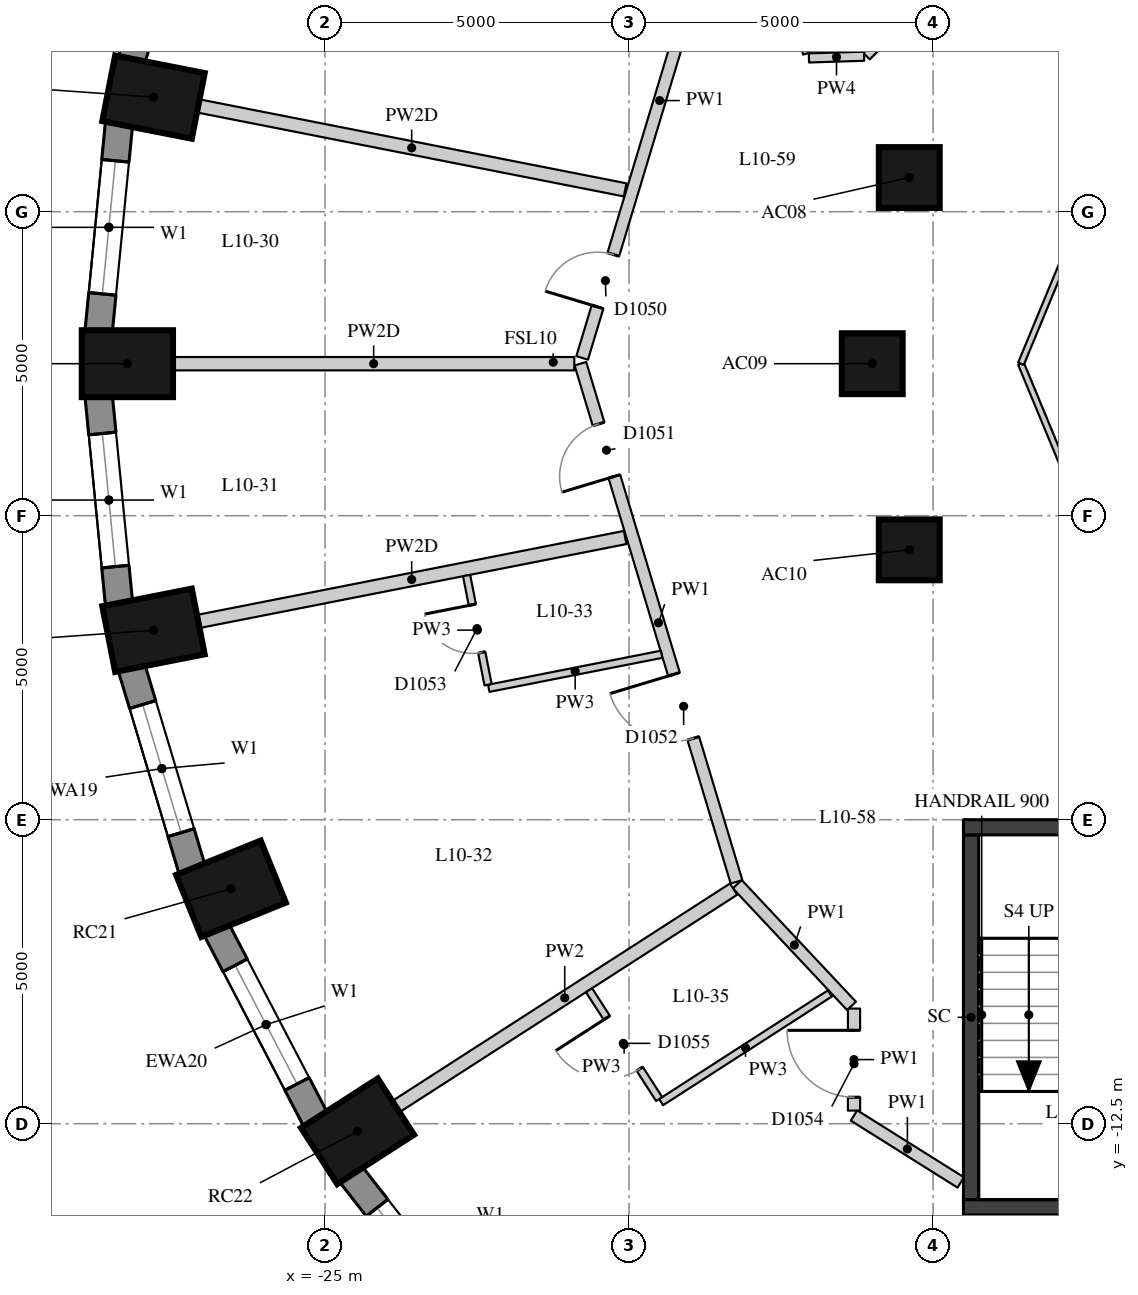
"""IFC4 building model, lengths in metres.
Left out: names, types, materials, properties, quantities, classifications, styles, units other than length and angle.
Written with IfcOpenShell. Run it as: python <this file> out.ifc"""

import sys

from ifc_helpers import new_model, si_unit, direction, frame, frame_2d, origin, origin_2d, place, context, subcontext, project, spatial, rectangle, extrude, element, fill, save


model = new_model("IFC4")
c1 = context("Model", 3, precision=1e-05, world=origin(), true_north=direction((0.0, 1.0)))
c2 = subcontext(c1, "Body", "Model", "MODEL_VIEW")
j1 = project(units=[si_unit("LENGTHUNIT", "METRE"), si_unit("PLANEANGLEUNIT", "RADIAN")], contexts=[c1])
p1 = place(None, origin())
s1 = spatial("IfcSite", under=j1, at=p1, CompositionType="ELEMENT")
p2 = place(p1, origin())
s2 = spatial("IfcBuilding", under=s1, at=p2, CompositionType="ELEMENT")
p3 = place(p2, frame((0.0, 0.0, 41.5)))
s3 = spatial("IfcBuildingStorey", under=s2, at=p3, CompositionType="ELEMENT", Elevation=41.5)
for number, where, z_axis, x_axis in (
    (1, (-27.821, 4.385, 0.0), (0.0, 0.0, 1.0), (-0.981, 0.193, 0.0)),
    (2, (-28.25, 0.0, 0.0), (0.0, 0.0, 1.0), (-1.0, 0.0, 0.0)),
    (3, (-27.821, -4.385, 0.0), (0.0, 0.0, 1.0), (-0.981, -0.193, 0.0)),
    (4, (-26.546, -8.636, 0.0), (0.0, 0.0, 1.0), (-0.927, -0.376, 0.0)),
    (5, (-24.465, -12.625, 0.0), (0.0, 0.0, 1.0), (-0.841, -0.541, 0.0)),
):
    element("IfcColumn", number, at=place(p3, frame(where, z_axis=z_axis, x_axis=x_axis)), inside=s3, PredefinedType="COLUMN", context=c2, shape_type="SweptSolid", body=[
        extrude(rectangle(XDim=1.5, YDim=1.1, at=origin_2d()), origin(), (0.0, 0.0, 1.0), 3.3),
    ])
for number, where, z_axis, x_axis in (
    (6, (-15.391, 3.062, 0.0), (0.0, 0.0, 1.0), (1.0, 0.0, 0.0)),
    (7, (-16.0, 0.0, 0.0), (0.0, 0.0, 1.0), (1.0, 0.0, 0.0)),
    (8, (-15.391, -3.062, 0.0), (0.0, 0.0, 1.0), (1.0, 0.0, 0.0)),
):
    element("IfcColumn", number, at=place(p3, frame(where, z_axis=z_axis, x_axis=x_axis)), inside=s3, PredefinedType="COLUMN", context=c2, shape_type="SweptSolid", body=[
        extrude(rectangle(XDim=1.0, YDim=1.0, at=origin_2d()), origin(), (0.0, 0.0, 1.0), 3.3),
    ])
p4 = place(p3, frame((-27.185, 8.323, 0.0), z_axis=(0.0, 0.0, 1.0), x_axis=(-0.287064133733, -0.957911364963, 0.0)))
e9 = element("IfcWall", 9, at=p4, inside=s3, PredefinedType="SOLIDWALL", context=c2, shape_type="SweptSolid", body=[
    extrude(rectangle(XDim=3.473, YDim=0.45, at=frame_2d((1.737, 0.0))), origin(), (0.0, 0.0, 1.0), 3.02),
])
p5 = place(p4, frame((0.637, 0.0, 0.4)))
e10 = element("IfcOpeningElement", 10, at=p5, cuts=e9, PredefinedType="OPENING", context=c2, shape_type="SweptSolid", body=[
    extrude(rectangle(XDim=2.2, YDim=1.75, at=frame_2d((1.1, 0.875))), frame((0.0, 0.235, 0.0), z_axis=(0.0, -1.0, 0.0), x_axis=(1.0, 0.0, 0.0)), (0.0, 0.0, 1.0), 0.47),
])
p6 = place(p3, frame((-28.387, 3.956, 0.0), z_axis=(0.0, 0.0, 1.0), x_axis=(-0.097389581596, -0.995246336038, 0.0)))
e11 = element("IfcWall", 11, at=p6, inside=s3, PredefinedType="SOLIDWALL", context=c2, shape_type="SweptSolid", body=[
    extrude(rectangle(XDim=3.442, YDim=0.45, at=frame_2d((1.721, 0.0))), origin(), (0.0, 0.0, 1.0), 3.02),
])
p7 = place(p6, frame((0.621, 0.0, 0.4)))
e12 = element("IfcOpeningElement", 12, at=p7, cuts=e11, PredefinedType="OPENING", context=c2, shape_type="SweptSolid", body=[
    extrude(rectangle(XDim=2.2, YDim=1.75, at=frame_2d((1.1, 0.875))), frame((0.0, 0.235, 0.0), z_axis=(0.0, -1.0, 0.0), x_axis=(1.0, 0.0, 0.0)), (0.0, 0.0, 1.0), 0.47),
])
p8 = place(p3, frame((-28.722, -0.53, 0.0), z_axis=(0.0, 0.0, 1.0), x_axis=(0.097389581596, -0.995246336038, 0.0)))
e13 = element("IfcWall", 13, at=p8, inside=s3, PredefinedType="SOLIDWALL", context=c2, shape_type="SweptSolid", body=[
    extrude(rectangle(XDim=3.442, YDim=0.45, at=frame_2d((1.721, 0.0))), origin(), (0.0, 0.0, 1.0), 3.02),
])
p9 = place(p8, frame((0.621, 0.0, 0.4)))
e14 = element("IfcOpeningElement", 14, at=p9, cuts=e13, PredefinedType="OPENING", context=c2, shape_type="SweptSolid", body=[
    extrude(rectangle(XDim=2.2, YDim=1.75, at=frame_2d((1.1, 0.875))), frame((0.0, 0.235, 0.0), z_axis=(0.0, -1.0, 0.0), x_axis=(1.0, 0.0, 0.0)), (0.0, 0.0, 1.0), 0.47),
])
p10 = place(p3, frame((-28.182, -4.996, 0.0), z_axis=(0.0, 0.0, 1.0), x_axis=(0.287064133733, -0.957911364963, 0.0)))
e15 = element("IfcWall", 15, at=p10, inside=s3, PredefinedType="SOLIDWALL", context=c2, shape_type="SweptSolid", body=[
    extrude(rectangle(XDim=3.473, YDim=0.45, at=frame_2d((1.737, 0.0))), origin(), (0.0, 0.0, 1.0), 3.02),
])
p11 = place(p10, frame((0.637, 0.0, 0.4)))
e16 = element("IfcOpeningElement", 16, at=p11, cuts=e15, PredefinedType="OPENING", context=c2, shape_type="SweptSolid", body=[
    extrude(rectangle(XDim=2.2, YDim=1.75, at=frame_2d((1.1, 0.875))), frame((0.0, 0.235, 0.0), z_axis=(0.0, -1.0, 0.0), x_axis=(1.0, 0.0, 0.0)), (0.0, 0.0, 1.0), 0.47),
])
p12 = place(p3, frame((-26.786, -9.305, 0.0), z_axis=(0.0, 0.0, 1.0), x_axis=(0.462492775226, -0.886623050041, 0.0)))
e17 = element("IfcWall", 17, at=p12, inside=s3, PredefinedType="SOLIDWALL", context=c2, shape_type="SweptSolid", body=[
    extrude(rectangle(XDim=3.532, YDim=0.45, at=frame_2d((1.766, 0.0))), origin(), (0.0, 0.0, 1.0), 3.02),
])
p13 = place(p12, frame((0.666, 0.0, 0.4)))
e18 = element("IfcOpeningElement", 18, at=p13, cuts=e17, PredefinedType="OPENING", context=c2, shape_type="SweptSolid", body=[
    extrude(rectangle(XDim=2.2, YDim=1.75, at=frame_2d((1.1, 0.875))), frame((0.0, 0.235, 0.0), z_axis=(0.0, -1.0, 0.0), x_axis=(1.0, 0.0, 0.0)), (0.0, 0.0, 1.0), 0.47),
])
p14 = place(p3, frame((-24.578, -13.328, 0.0), z_axis=(0.0, 0.0, 1.0), x_axis=(0.616661975264, -0.787228053529, 0.0)))
e19 = element("IfcWall", 19, at=p14, inside=s3, PredefinedType="SOLIDWALL", context=c2, shape_type="SweptSolid", body=[
    extrude(rectangle(XDim=3.61, YDim=0.45, at=frame_2d((1.805, 0.0))), origin(), (0.0, 0.0, 1.0), 3.02),
])
p15 = place(p14, frame((0.705, 0.0, 0.4)))
e20 = element("IfcOpeningElement", 20, at=p15, cuts=e19, PredefinedType="OPENING", context=c2, shape_type="SweptSolid", body=[
    extrude(rectangle(XDim=2.2, YDim=1.75, at=frame_2d((1.1, 0.875))), frame((0.0, 0.235, 0.0), z_axis=(0.0, -1.0, 0.0), x_axis=(1.0, 0.0, 0.0)), (0.0, 0.0, 1.0), 0.47),
])
p16 = place(p3, frame((-14.375, -13.75, -0.28), z_axis=(0.0, 0.0, 1.0), x_axis=(0.0, 1.0, 0.0)))
e21 = element("IfcWall", 21, at=p16, inside=s3, PredefinedType="SHEAR", context=c2, shape_type="SweptSolid", body=[
    extrude(rectangle(XDim=6.0, YDim=0.25, at=frame_2d((3.0, 0.0))), origin(), (0.0, 0.0, 1.0), 3.3),
])
for number, where, z_axis, x_axis in (
    (22, (-14.5, -7.625, -0.28), (0.0, 0.0, 1.0), (1.0, 0.0, 0.0)),
    (23, (-14.5, -13.875, -0.28), (0.0, 0.0, 1.0), (1.0, 0.0, 0.0)),
):
    element("IfcWall", number, at=place(p3, frame(where, z_axis=z_axis, x_axis=x_axis)), inside=s3, PredefinedType="SHEAR", context=c2, shape_type="SweptSolid", body=[
        extrude(rectangle(XDim=5.2, YDim=0.25, at=frame_2d((2.6, 0.0))), origin(), (0.0, 0.0, 1.0), 3.3),
    ])
p17 = place(p3, frame((-14.545, -13.466, 0.0), z_axis=(0.0, 0.0, 1.0), x_axis=(-0.846977572949, 0.53162862124, 0.0)))
e24 = element("IfcWall", 24, at=p17, inside=s3, PredefinedType="PARTITIONING", context=c2, shape_type="SweptSolid", body=[
    extrude(rectangle(XDim=2.073, YDim=0.2, at=frame_2d((1.036, 0.0))), origin(), (0.0, 0.0, 1.0), 3.02),
])
p18 = place(p3, frame((-16.3, -12.284, 0.0), z_axis=(0.0, 0.0, 1.0), x_axis=(0.0, 1.0, 0.0)))
e25 = element("IfcWall", 25, at=p18, inside=s3, PredefinedType="PARTITIONING", context=c2, shape_type="SweptSolid", body=[
    extrude(rectangle(XDim=1.678, YDim=0.2, at=frame_2d((0.839, 0.0))), origin(), (0.0, 0.0, 1.0), 3.02),
])
p19 = place(p18, frame((0.22, 0.0, 0.0)))
e26 = element("IfcOpeningElement", 26, at=p19, cuts=e25, PredefinedType="OPENING", context=c2, shape_type="SweptSolid", body=[
    extrude(rectangle(XDim=1.1, YDim=2.1, at=frame_2d((0.55, 1.05))), frame((0.0, 0.11, 0.0), z_axis=(0.0, -1.0, 0.0), x_axis=(1.0, 0.0, 0.0)), (0.0, 0.0, 1.0), 0.22),
])
p20 = place(p3, frame((-16.341, -10.562, 0.0), z_axis=(0.0, 0.0, 1.0), x_axis=(-0.684393472021, 0.729112868803, 0.0)))
e27 = element("IfcWall", 27, at=p20, inside=s3, PredefinedType="PARTITIONING", context=c2, shape_type="SweptSolid", body=[
    extrude(rectangle(XDim=2.746, YDim=0.2, at=frame_2d((1.373, 0.0))), origin(), (0.0, 0.0, 1.0), 3.02),
])
p21 = place(p3, frame((-18.232, -8.522, 0.0), z_axis=(0.0, 0.0, 1.0), x_axis=(-0.288502732396, 0.957479072043, 0.0)))
e28 = element("IfcWall", 28, at=p21, inside=s3, PredefinedType="PARTITIONING", context=c2, shape_type="SweptSolid", body=[
    extrude(rectangle(XDim=8.901, YDim=0.2, at=frame_2d((4.45, 0.0))), origin(), (0.0, 0.0, 1.0), 3.02),
])
p22 = place(p21, frame((6.965, 0.0, 0.0)))
e29 = element("IfcOpeningElement", 29, at=p22, cuts=e28, PredefinedType="OPENING", context=c2, shape_type="SweptSolid", body=[
    extrude(rectangle(XDim=0.9, YDim=2.1, at=frame_2d((0.45, 1.05))), frame((0.0, 0.11, 0.0), z_axis=(0.0, -1.0, 0.0), x_axis=(1.0, 0.0, 0.0)), (0.0, 0.0, 1.0), 0.22),
])
p23 = place(p21, frame((2.465, 0.0, 0.0)))
e30 = element("IfcOpeningElement", 30, at=p23, cuts=e28, PredefinedType="OPENING", context=c2, shape_type="SweptSolid", body=[
    extrude(rectangle(XDim=1.1, YDim=2.1, at=frame_2d((0.55, 1.05))), frame((0.0, 0.11, 0.0), z_axis=(0.0, -1.0, 0.0), x_axis=(1.0, 0.0, 0.0)), (0.0, 0.0, 1.0), 0.22),
])
p24 = place(p3, frame((-20.771, 0.095, 0.0), z_axis=(0.0, 0.0, 1.0), x_axis=(0.288464952331, 0.957490454927, 0.0)))
e31 = element("IfcWall", 31, at=p24, inside=s3, PredefinedType="PARTITIONING", context=c2, shape_type="SweptSolid", body=[
    extrude(rectangle(XDim=8.841, YDim=0.2, at=frame_2d((4.42, 0.0))), origin(), (0.0, 0.0, 1.0), 3.02),
])
p25 = place(p24, frame((7.521, 0.0, 0.0)))
e32 = element("IfcOpeningElement", 32, at=p25, cuts=e31, PredefinedType="OPENING", context=c2, shape_type="SweptSolid", body=[
    extrude(rectangle(XDim=1.1, YDim=2.1, at=frame_2d((0.55, 1.05))), frame((0.0, 0.11, 0.0), z_axis=(0.0, -1.0, 0.0), x_axis=(1.0, 0.0, 0.0)), (0.0, 0.0, 1.0), 0.22),
])
p26 = place(p24, frame((0.877, 0.0, 0.0)))
e33 = element("IfcOpeningElement", 33, at=p26, cuts=e31, PredefinedType="OPENING", context=c2, shape_type="SweptSolid", body=[
    extrude(rectangle(XDim=0.9, YDim=2.1, at=frame_2d((0.45, 1.05))), frame((0.0, 0.11, 0.0), z_axis=(0.0, -1.0, 0.0), x_axis=(1.0, 0.0, 0.0)), (0.0, 0.0, 1.0), 0.22),
])
p27 = place(p3, frame((-10.972, -15.708, 0.0), z_axis=(0.0, 0.0, 1.0), x_axis=(-0.846954991261, 0.53166459613, 0.0)))
e34 = element("IfcWall", 34, at=p27, inside=s3, PredefinedType="PARTITIONING", context=c2, shape_type="SweptSolid", body=[
    extrude(rectangle(XDim=3.068, YDim=0.2, at=frame_2d((1.534, 0.0))), origin(), (0.0, 0.0, 1.0), 3.02),
])
p28 = place(p3, frame((-14.542, 6.61, 0.0), z_axis=(0.0, 0.0, 1.0), x_axis=(-0.707106781187, -0.707106781187, 0.0)))
e35 = element("IfcWall", 35, at=p28, inside=s3, PredefinedType="PARTITIONING", context=c2, shape_type="SweptSolid", body=[
    extrude(rectangle(XDim=2.195, YDim=0.15, at=frame_2d((1.097, 0.0))), origin(), (0.0, 0.0, 1.0), 3.02),
])
p29 = place(p28, frame((0.647, 0.0, 0.0)))
e36 = element("IfcOpeningElement", 36, at=p29, cuts=e35, PredefinedType="OPENING", context=c2, shape_type="SweptSolid", body=[
    extrude(rectangle(XDim=0.9, YDim=2.1, at=frame_2d((0.45, 1.05))), frame((0.0, 0.085, 0.0), z_axis=(0.0, -1.0, 0.0), x_axis=(1.0, 0.0, 0.0)), (0.0, 0.0, 1.0), 0.17),
])
p30 = place(p3, frame((-16.134, 5.057, 0.0), z_axis=(0.0, 0.0, 1.0), x_axis=(-0.999529504487, -0.030671968644, 0.0)))
e37 = element("IfcWall", 37, at=p30, inside=s3, PredefinedType="PARTITIONING", context=c2, shape_type="SweptSolid", body=[
    extrude(rectangle(XDim=0.907, YDim=0.15, at=frame_2d((0.454, 0.0))), origin(), (0.0, 0.0, 1.0), 3.02),
])
p31 = place(p3, frame((-17.065, 5.105, 0.0), z_axis=(0.0, 0.0, 1.0), x_axis=(-0.291495658108, 0.956572151646, 0.0)))
e38 = element("IfcWall", 38, at=p31, inside=s3, PredefinedType="PARTITIONING", context=c2, shape_type="SweptSolid", body=[
    extrude(rectangle(XDim=0.523, YDim=0.15, at=frame_2d((0.262, 0.0))), origin(), (0.0, 0.0, 1.0), 3.02),
])
p32 = place(p3, frame((-27.085, 4.24, 0.0), z_axis=(0.0, 0.0, 1.0), x_axis=(0.981197740145, -0.193005167635, 0.0)))
e39 = element("IfcWall", 39, at=p32, inside=s3, PredefinedType="PARTITIONING", context=c2, shape_type="SweptSolid", body=[
    extrude(rectangle(XDim=7.156, YDim=0.22, at=frame_2d((3.578, 0.0))), origin(), (0.0, 0.0, 1.0), 2.47),
])
p33 = place(p3, frame((-27.5, 0.0, 0.0), z_axis=(0.0, 0.0, 1.0), x_axis=(1.0, 0.0, 0.0)))
e40 = element("IfcWall", 40, at=p33, inside=s3, PredefinedType="PARTITIONING", context=c2, shape_type="SweptSolid", body=[
    extrude(rectangle(XDim=6.6, YDim=0.22, at=frame_2d((3.3, 0.0))), origin(), (0.0, 0.0, 1.0), 2.47),
])
p34 = place(p3, frame((-27.085, -4.24, 0.0), z_axis=(0.0, 0.0, 1.0), x_axis=(0.981197740145, 0.193005167635, 0.0)))
e41 = element("IfcWall", 41, at=p34, inside=s3, PredefinedType="PARTITIONING", context=c2, shape_type="SweptSolid", body=[
    extrude(rectangle(XDim=7.156, YDim=0.22, at=frame_2d((3.578, 0.0))), origin(), (0.0, 0.0, 1.0), 2.47),
])
p35 = place(p3, frame((-23.835, -12.219, 0.0), z_axis=(0.0, 0.0, 1.0), x_axis=(0.840757959101, 0.541411169268, 0.0)))
e42 = element("IfcWall", 42, at=p35, inside=s3, PredefinedType="PARTITIONING", context=c2, shape_type="SweptSolid", body=[
    extrude(rectangle(XDim=6.606, YDim=0.22, at=frame_2d((3.303, 0.0))), origin(), (0.0, 0.0, 1.0), 3.02),
])
p36 = place(p3, frame((-16.927, -17.638, 0.0), z_axis=(0.0, 0.0, 1.0), x_axis=(0.601158965663, 0.799129462605, 0.0)))
e43 = element("IfcWall", 43, at=p36, inside=s3, PredefinedType="PARTITIONING", context=c2, shape_type="SweptSolid", body=[
    extrude(rectangle(XDim=4.48, YDim=0.22, at=frame_2d((2.24, 0.0))), origin(), (0.0, 0.0, 1.0), 2.57),
])
p37 = place(p3, frame((-19.464, -4.779, 0.0), z_axis=(0.0, 0.0, 1.0), x_axis=(-0.981185297697, -0.193068411666, 0.0)))
e44 = element("IfcWall", 44, at=p37, inside=s3, PredefinedType="PARTITIONING", context=c2, shape_type="SweptSolid", body=[
    extrude(rectangle(XDim=2.897, YDim=0.12, at=frame_2d((1.448, 0.0))), origin(), (0.0, 0.0, 1.0), 3.02),
])
p38 = place(p3, frame((-16.697, -10.358, 0.0), z_axis=(0.0, 0.0, 1.0), x_axis=(-0.84073116979, -0.541452768156, 0.0)))
e45 = element("IfcWall", 45, at=p38, inside=s3, PredefinedType="PARTITIONING", context=c2, shape_type="SweptSolid", body=[
    extrude(rectangle(XDim=3.301, YDim=0.12, at=frame_2d((1.65, 0.0))), origin(), (0.0, 0.0, 1.0), 3.02),
])
p39 = place(p3, frame((-22.318, -5.28, 0.0), z_axis=(0.0, 0.0, 1.0), x_axis=(-0.193036598643, 0.981191557029, 0.0)))
e46 = element("IfcWall", 46, at=p39, inside=s3, PredefinedType="PARTITIONING", context=c2, shape_type="SweptSolid", body=[
    extrude(rectangle(XDim=1.83, YDim=0.12, at=frame_2d((0.915, 0.0))), origin(), (0.0, 0.0, 1.0), 3.02),
])
p40 = place(p39, frame((0.54, 0.0, 0.0)))
e47 = element("IfcOpeningElement", 47, at=p40, cuts=e46, PredefinedType="OPENING", context=c2, shape_type="SweptSolid", body=[
    extrude(rectangle(XDim=0.8, YDim=2.1, at=frame_2d((0.4, 1.05))), frame((0.0, 0.07, 0.0), z_axis=(0.0, -1.0, 0.0), x_axis=(1.0, 0.0, 0.0)), (0.0, 0.0, 1.0), 0.14),
])
p41 = place(p3, frame((-19.504, -12.095, 0.0), z_axis=(0.0, 0.0, 1.0), x_axis=(-0.541591545821, 0.840641777153, 0.0)))
e48 = element("IfcWall", 48, at=p41, inside=s3, PredefinedType="PARTITIONING", context=c2, shape_type="SweptSolid", body=[
    extrude(rectangle(XDim=2.13, YDim=0.12, at=frame_2d((1.065, 0.0))), origin(), (0.0, 0.0, 1.0), 3.02),
])
p42 = place(p41, frame((0.59, 0.0, 0.0)))
e49 = element("IfcOpeningElement", 49, at=p42, cuts=e48, PredefinedType="OPENING", context=c2, shape_type="SweptSolid", body=[
    extrude(rectangle(XDim=1.0, YDim=2.1, at=frame_2d((0.5, 1.05))), frame((0.0, 0.07, 0.0), z_axis=(0.0, -1.0, 0.0), x_axis=(1.0, 0.0, 0.0)), (0.0, 0.0, 1.0), 0.14),
])
for number, where, z_axis, x_axis in (
    (50, (-11.927, -3.927, 0.0), (0.0, 0.0, 1.0), (-0.383, 0.924, 0.0)),
    (51, (-13.554, 0.0, 0.0), (0.0, 0.0, 1.0), (0.383, 0.924, 0.0)),
):
    element("IfcWall", number, at=place(p3, frame(where, z_axis=z_axis, x_axis=x_axis)), inside=s3, PredefinedType="PARTITIONING", context=c2, shape_type="SweptSolid", body=[
        extrude(rectangle(XDim=4.251, YDim=0.1, at=frame_2d((2.125, 0.0))), origin(), (0.0, 0.0, 1.0), 3.02),
    ])
p43 = place(p7, origin())
e52 = element("IfcWindow", 52, at=p43, inside=s3, PartitioningType="SINGLE_PANEL", PredefinedType="WINDOW", context=c2, shape_type="SweptSolid", body=[
    extrude(rectangle(XDim=2.2, YDim=1.75, at=frame_2d((1.1, 0.875))), frame((0.0, 0.035, 0.0), z_axis=(0.0, -1.0, 0.0), x_axis=(1.0, 0.0, 0.0)), (0.0, 0.0, 1.0), 0.06),
])
fill(e12, e52)
p44 = place(p9, origin())
e53 = element("IfcWindow", 53, at=p44, inside=s3, PartitioningType="SINGLE_PANEL", PredefinedType="WINDOW", context=c2, shape_type="SweptSolid", body=[
    extrude(rectangle(XDim=2.2, YDim=1.75, at=frame_2d((1.1, 0.875))), frame((0.0, 0.035, 0.0), z_axis=(0.0, -1.0, 0.0), x_axis=(1.0, 0.0, 0.0)), (0.0, 0.0, 1.0), 0.06),
])
fill(e14, e53)
p45 = place(p11, origin())
e54 = element("IfcWindow", 54, at=p45, inside=s3, PartitioningType="SINGLE_PANEL", PredefinedType="WINDOW", context=c2, shape_type="SweptSolid", body=[
    extrude(rectangle(XDim=2.2, YDim=1.75, at=frame_2d((1.1, 0.875))), frame((0.0, 0.035, 0.0), z_axis=(0.0, -1.0, 0.0), x_axis=(1.0, 0.0, 0.0)), (0.0, 0.0, 1.0), 0.06),
])
fill(e16, e54)
p46 = place(p13, origin())
e55 = element("IfcWindow", 55, at=p46, inside=s3, PartitioningType="SINGLE_PANEL", PredefinedType="WINDOW", context=c2, shape_type="SweptSolid", body=[
    extrude(rectangle(XDim=2.2, YDim=1.75, at=frame_2d((1.1, 0.875))), frame((0.0, 0.035, 0.0), z_axis=(0.0, -1.0, 0.0), x_axis=(1.0, 0.0, 0.0)), (0.0, 0.0, 1.0), 0.06),
])
fill(e18, e55)
p47 = place(p15, origin())
e56 = element("IfcWindow", 56, at=p47, inside=s3, PartitioningType="SINGLE_PANEL", PredefinedType="WINDOW", context=c2, shape_type="SweptSolid", body=[
    extrude(rectangle(XDim=2.2, YDim=1.75, at=frame_2d((1.1, 0.875))), frame((0.0, 0.035, 0.0), z_axis=(0.0, -1.0, 0.0), x_axis=(1.0, 0.0, 0.0)), (0.0, 0.0, 1.0), 0.06),
])
fill(e20, e56)
p48 = place(p26, origin())
e57 = element("IfcDoor", 57, at=p48, inside=s3, OperationType="SINGLE_SWING_LEFT", PredefinedType="DOOR", context=c2, shape_type="SweptSolid", body=[
    extrude(rectangle(XDim=0.9, YDim=2.1, at=frame_2d((0.45, 1.05))), frame((0.0, 0.025, 0.0), z_axis=(0.0, -1.0, 0.0), x_axis=(1.0, 0.0, 0.0)), (0.0, 0.0, 1.0), 0.05),
])
fill(e33, e57)
p49 = place(p22, origin())
e58 = element("IfcDoor", 58, at=p49, inside=s3, OperationType="SINGLE_SWING_LEFT", PredefinedType="DOOR", context=c2, shape_type="SweptSolid", body=[
    extrude(rectangle(XDim=0.9, YDim=2.1, at=frame_2d((0.45, 1.05))), frame((0.0, 0.025, 0.0), z_axis=(0.0, -1.0, 0.0), x_axis=(1.0, 0.0, 0.0)), (0.0, 0.0, 1.0), 0.05),
])
fill(e29, e58)
p50 = place(p23, origin())
e59 = element("IfcDoor", 59, at=p50, inside=s3, OperationType="SINGLE_SWING_RIGHT", PredefinedType="DOOR", context=c2, shape_type="SweptSolid", body=[
    extrude(rectangle(XDim=1.1, YDim=2.1, at=frame_2d((0.55, 1.05))), frame((0.0, 0.025, 0.0), z_axis=(0.0, -1.0, 0.0), x_axis=(1.0, 0.0, 0.0)), (0.0, 0.0, 1.0), 0.05),
])
fill(e30, e59)
p51 = place(p40, origin())
e60 = element("IfcDoor", 60, at=p51, inside=s3, OperationType="SINGLE_SWING_RIGHT", PredefinedType="DOOR", context=c2, shape_type="SweptSolid", body=[
    extrude(rectangle(XDim=0.8, YDim=2.1, at=frame_2d((0.4, 1.05))), frame((0.0, 0.025, 0.0), z_axis=(0.0, -1.0, 0.0), x_axis=(1.0, 0.0, 0.0)), (0.0, 0.0, 1.0), 0.05),
])
fill(e47, e60)
p52 = place(p19, origin())
e61 = element("IfcDoor", 61, at=p52, inside=s3, OperationType="SINGLE_SWING_RIGHT", PredefinedType="DOOR", context=c2, shape_type="SweptSolid", body=[
    extrude(rectangle(XDim=1.1, YDim=2.1, at=frame_2d((0.55, 1.05))), frame((0.0, 0.025, 0.0), z_axis=(0.0, -1.0, 0.0), x_axis=(1.0, 0.0, 0.0)), (0.0, 0.0, 1.0), 0.05),
])
fill(e26, e61)
p53 = place(p42, origin())
e62 = element("IfcDoor", 62, at=p53, inside=s3, OperationType="SINGLE_SWING_RIGHT", PredefinedType="DOOR", context=c2, shape_type="SweptSolid", body=[
    extrude(rectangle(XDim=1.0, YDim=2.1, at=frame_2d((0.5, 1.05))), frame((0.0, 0.025, 0.0), z_axis=(0.0, -1.0, 0.0), x_axis=(1.0, 0.0, 0.0)), (0.0, 0.0, 1.0), 0.05),
])
fill(e49, e62)
save(model, sys.argv[1])
